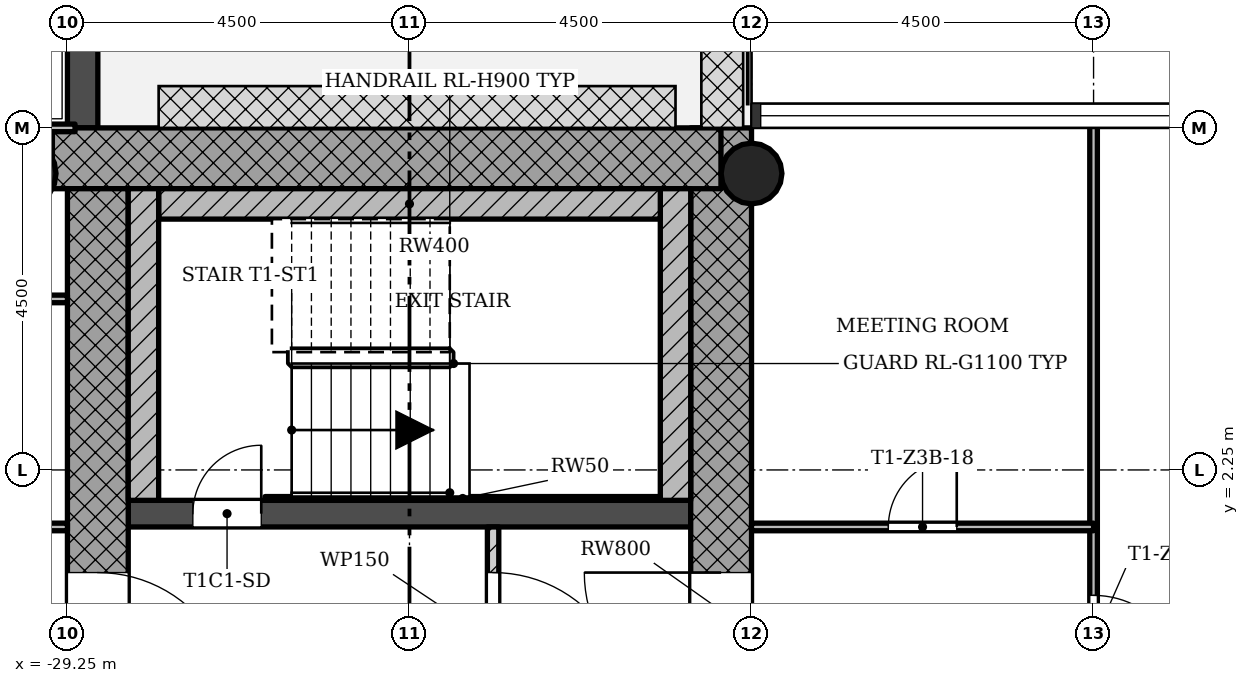
"""IFC4 building model, lengths in metres.
Left out: names, types, materials, properties, quantities, classifications, styles, units other than length and angle.
Written with IfcOpenShell. Run it as: python <this file> out.ifc"""

import sys

from ifc_helpers import new_model, si_unit, direction, frame, frame_2d, origin, origin_2d, place, context, subcontext, project, spatial, rectangle, hollow_circle, extrude, element, fill, save


model = new_model("IFC4")
c1 = context("Model", 3, precision=1e-05, world=origin(), true_north=direction((0.0, 1.0)))
c2 = subcontext(c1, "Body", "Model", "MODEL_VIEW")
j1 = project(units=[si_unit("LENGTHUNIT", "METRE"), si_unit("PLANEANGLEUNIT", "RADIAN")], contexts=[c1])
p1 = place(None, origin())
s1 = spatial("IfcSite", under=j1, at=p1, CompositionType="ELEMENT")
p2 = place(p1, origin())
s2 = spatial("IfcBuilding", under=s1, at=p2, CompositionType="ELEMENT")
p3 = place(p2, frame((0.0, 0.0, 147.3)))
s3 = spatial("IfcBuildingStorey", under=s2, at=p3, CompositionType="ELEMENT", Elevation=147.3)
p4 = place(p3, frame((-20.65, -5.95, 0.0), z_axis=(0.0, 0.0, 1.0), x_axis=(0.0, 1.0, 0.0)))
e1 = element("IfcWall", 1, at=p4, inside=s3, PredefinedType="SHEAR", context=c2, shape_type="SweptSolid", body=[
    extrude(rectangle(XDim=12.7, YDim=0.8, at=frame_2d((6.35, 0.0))), origin(), (0.0, 0.0, 1.0), 3.4),
])
p5 = place(p4, frame((5.05, 0.0, 0.0)))
e2 = element("IfcOpeningElement", 2, at=p5, cuts=e1, PredefinedType="OPENING", context=c2, shape_type="SweptSolid", body=[
    extrude(rectangle(XDim=1.8, YDim=2.1, at=frame_2d((0.9, 1.05))), frame((0.0, 0.41, 0.0), z_axis=(0.0, -1.0, 0.0), x_axis=(1.0, 0.0, 0.0)), (0.0, 0.0, 1.0), 0.82),
])
p6 = place(p3, frame((-20.652, 6.35, 0.0), z_axis=(0.0, 0.0, 1.0), x_axis=(-1.0, 0.0, 0.0)))
e3 = element("IfcWall", 3, at=p6, inside=s3, PredefinedType="SHEAR", context=c2, shape_type="SweptSolid", body=[
    extrude(rectangle(XDim=8.796, YDim=0.8, at=frame_2d((4.398, 0.0))), origin(), (0.0, 0.0, 1.0), 3.4),
])
p7 = place(p3, frame((-28.85, 5.95, 0.0), z_axis=(0.0, 0.0, 1.0), x_axis=(0.0, -1.0, 0.0)))
e4 = element("IfcWall", 4, at=p7, inside=s3, PredefinedType="SHEAR", context=c2, shape_type="SweptSolid", body=[
    extrude(rectangle(XDim=12.7, YDim=0.8, at=frame_2d((6.35, 0.0))), origin(), (0.0, 0.0, 1.0), 3.4),
])
p8 = place(p7, frame((5.05, 0.0, 0.0)))
e5 = element("IfcOpeningElement", 5, at=p8, cuts=e4, PredefinedType="OPENING", context=c2, shape_type="SweptSolid", body=[
    extrude(rectangle(XDim=1.8, YDim=2.1, at=frame_2d((0.9, 1.05))), frame((0.0, 0.41, 0.0), z_axis=(0.0, -1.0, 0.0), x_axis=(1.0, 0.0, 0.0)), (0.0, 0.0, 1.0), 0.82),
])
p9 = place(p3, frame((-28.45, 1.675, 0.0), z_axis=(0.0, 0.0, 1.0), x_axis=(1.0, 0.0, 0.0)))
e6 = element("IfcWall", 6, at=p9, inside=s3, PredefinedType="SHEAR", context=c2, shape_type="SweptSolid", body=[
    extrude(rectangle(XDim=7.4, YDim=0.35, at=frame_2d((3.7, 0.0))), origin(), (0.0, 0.0, 1.0), 3.4),
])
p10 = place(p9, frame((0.85, 0.0, 0.0)))
e7 = element("IfcOpeningElement", 7, at=p10, cuts=e6, PredefinedType="OPENING", context=c2, shape_type="SweptSolid", body=[
    extrude(rectangle(XDim=0.9, YDim=2.1, at=frame_2d((0.45, 1.05))), frame((0.0, 0.185, 0.0), z_axis=(0.0, -1.0, 0.0), x_axis=(1.0, 0.0, 0.0)), (0.0, 0.0, 1.0), 0.37),
])
p11 = place(p3, frame((-20.25, 6.15, 0.0), z_axis=(0.0, 0.0, 1.0), x_axis=(1.0, 0.0, 0.0)))
e8 = element("IfcColumn", 8, at=p11, inside=s3, PredefinedType="COLUMN", context=c2, shape_type="SweptSolid", body=[
    extrude(hollow_circle(Radius=0.4, WallThickness=0.028, at=origin_2d()), origin(), (0.0, 0.0, 1.0), 3.4),
])
p12 = place(p3, frame((-29.85, 6.15, 0.0), z_axis=(0.0, 0.0, 1.0), x_axis=(1.0, 0.0, 0.0)))
e9 = element("IfcColumn", 9, at=p12, inside=s3, PredefinedType="COLUMN", context=c2, shape_type="SweptSolid", body=[
    extrude(hollow_circle(Radius=0.45, WallThickness=0.032, at=origin_2d()), origin(), (0.0, 0.0, 1.0), 3.4),
])
p13 = place(p3, frame((-29.05, 6.75, -0.02), z_axis=(0.0, 0.0, 1.0), x_axis=(0.0, 1.0, 0.0)))
e10 = element("IfcWall", 10, at=p13, inside=s3, PredefinedType="STANDARD", context=c2, shape_type="SweptSolid", body=[
    extrude(rectangle(XDim=4.5, YDim=0.4, at=frame_2d((2.25, 0.0))), origin(), (0.0, 0.0, 1.0), 3.12),
])
p14 = place(p13, frame((1.35, 0.0, 0.02)))
e11 = element("IfcOpeningElement", 11, at=p14, cuts=e10, PredefinedType="OPENING", context=c2, shape_type="SweptSolid", body=[
    extrude(rectangle(XDim=1.8, YDim=2.1, at=frame_2d((0.9, 1.05))), frame((0.0, 0.21, 0.0), z_axis=(0.0, -1.0, 0.0), x_axis=(1.0, 0.0, 0.0)), (0.0, 0.0, 1.0), 0.42),
])
p15 = place(p3, frame((-23.65, -1.5, 0.0), z_axis=(0.0, 0.0, 1.0), x_axis=(0.0, 1.0, 0.0)))
e12 = element("IfcWall", 12, at=p15, inside=s3, PredefinedType="PARTITIONING", context=c2, shape_type="SweptSolid", body=[
    extrude(rectangle(XDim=3.0, YDim=0.15, at=frame_2d((1.5, 0.0))), origin(), (0.0, 0.0, 1.0), 3.0),
])
p16 = place(p15, frame((0.6, 0.0, 0.0)))
e13 = element("IfcOpeningElement", 13, at=p16, cuts=e12, PredefinedType="OPENING", context=c2, shape_type="SweptSolid", body=[
    extrude(rectangle(XDim=1.8, YDim=2.1, at=frame_2d((0.9, 1.05))), frame((0.0, 0.085, 0.0), z_axis=(0.0, -1.0, 0.0), x_axis=(1.0, 0.0, 0.0)), (0.0, 0.0, 1.0), 0.17),
])
p17 = place(p3, frame((-15.75, -1.5, 0.0), z_axis=(0.0, 0.0, 1.0), x_axis=(0.0, 1.0, 0.0)))
e14 = element("IfcWall", 14, at=p17, inside=s3, PredefinedType="PARTITIONING", context=c2, shape_type="SweptSolid", body=[
    extrude(rectangle(XDim=8.35, YDim=0.1, at=frame_2d((4.175, 0.0))), origin(), (0.0, 0.0, 1.0), 3.0),
])
p18 = place(p17, frame((0.9, 0.0, 0.0)))
e15 = element("IfcOpeningElement", 15, at=p18, cuts=e14, PredefinedType="OPENING", context=c2, shape_type="SweptSolid", body=[
    extrude(rectangle(XDim=1.2, YDim=2.1, at=frame_2d((0.6, 1.05))), frame((0.0, 0.06, 0.0), z_axis=(0.0, -1.0, 0.0), x_axis=(1.0, 0.0, 0.0)), (0.0, 0.0, 1.0), 0.12),
])
p19 = place(p3, frame((-31.5, 1.5, 0.0), z_axis=(0.0, 0.0, 1.0), x_axis=(1.0, 0.0, 0.0)))
e16 = element("IfcWall", 16, at=p19, inside=s3, PredefinedType="PARTITIONING", context=c2, shape_type="SweptSolid", body=[
    extrude(rectangle(XDim=2.25, YDim=0.1, at=frame_2d((1.125, 0.0))), origin(), (0.0, 0.0, 1.0), 3.0),
])
p20 = place(p3, frame((-20.25, 1.5, 0.0), z_axis=(0.0, 0.0, 1.0), x_axis=(1.0, 0.0, 0.0)))
e17 = element("IfcWall", 17, at=p20, inside=s3, PredefinedType="PARTITIONING", context=c2, shape_type="SweptSolid", body=[
    extrude(rectangle(XDim=4.5, YDim=0.1, at=frame_2d((2.25, 0.0))), origin(), (0.0, 0.0, 1.0), 3.0),
])
p21 = place(p20, frame((1.8, 0.0, 0.0)))
e18 = element("IfcOpeningElement", 18, at=p21, cuts=e17, PredefinedType="OPENING", context=c2, shape_type="SweptSolid", body=[
    extrude(rectangle(XDim=0.9, YDim=2.1, at=frame_2d((0.45, 1.05))), frame((0.0, 0.06, 0.0), z_axis=(0.0, -1.0, 0.0), x_axis=(1.0, 0.0, 0.0)), (0.0, 0.0, 1.0), 0.12),
])
p22 = place(p3, frame((-35.1, 4.5, 0.0), z_axis=(0.0, 0.0, 1.0), x_axis=(1.0, 0.0, 0.0)))
e19 = element("IfcWall", 19, at=p22, inside=s3, PredefinedType="PARTITIONING", context=c2, shape_type="SweptSolid", body=[
    extrude(rectangle(XDim=5.85, YDim=0.1, at=frame_2d((2.925, 0.0))), origin(), (0.0, 0.0, 1.0), 3.0),
])
p23 = place(p22, frame((1.35, 0.0, 0.0)))
e20 = element("IfcOpeningElement", 20, at=p23, cuts=e19, PredefinedType="OPENING", context=c2, shape_type="SweptSolid", body=[
    extrude(rectangle(XDim=0.9, YDim=2.1, at=frame_2d((0.45, 1.05))), frame((0.0, 0.06, 0.0), z_axis=(0.0, -1.0, 0.0), x_axis=(1.0, 0.0, 0.0)), (0.0, 0.0, 1.0), 0.12),
])
p24 = place(p3, frame((-35.1, 6.75, 0.0), z_axis=(0.0, 0.0, 1.0), x_axis=(1.0, 0.0, 0.0)))
e21 = element("IfcWall", 21, at=p24, inside=s3, PredefinedType="PARTITIONING", context=c2, shape_type="SweptSolid", body=[
    extrude(rectangle(XDim=5.95, YDim=0.1, at=frame_2d((2.975, 0.0))), origin(), (0.0, 0.0, 1.0), 3.0),
])
p25 = place(p3, frame((-21.25, 1.85, 0.0), z_axis=(0.0, 0.0, 1.0), x_axis=(0.0, 1.0, 0.0)))
e22 = element("IfcWall", 22, at=p25, inside=s3, PredefinedType="SHEAR", context=c2, shape_type="SweptSolid", body=[
    extrude(rectangle(XDim=4.1, YDim=0.4, at=frame_2d((2.05, 0.0))), origin(), (0.0, 0.0, 1.0), 3.4),
])
p26 = place(p3, frame((-28.05, 5.75, 0.0), z_axis=(0.0, 0.0, 1.0), x_axis=(1.0, 0.0, 0.0)))
e23 = element("IfcWall", 23, at=p26, inside=s3, PredefinedType="SHEAR", context=c2, shape_type="SweptSolid", body=[
    extrude(rectangle(XDim=6.6, YDim=0.4, at=frame_2d((3.3, 0.0))), origin(), (0.0, 0.0, 1.0), 3.4),
])
p27 = place(p3, frame((-28.25, 1.85, 0.0), z_axis=(0.0, 0.0, 1.0), x_axis=(0.0, 1.0, 0.0)))
e24 = element("IfcWall", 24, at=p27, inside=s3, PredefinedType="SHEAR", context=c2, shape_type="SweptSolid", body=[
    extrude(rectangle(XDim=4.1, YDim=0.4, at=frame_2d((2.05, 0.0))), origin(), (0.0, 0.0, 1.0), 3.4),
])
p28 = place(p3, frame((-26.65, 1.875, 0.0), z_axis=(0.0, 0.0, 1.0), x_axis=(1.0, 0.0, 0.0)))
e25 = element("IfcWall", 25, at=p28, inside=s3, PredefinedType="SHEAR", context=c2, shape_type="SweptSolid", body=[
    extrude(rectangle(XDim=5.2, YDim=0.05, at=frame_2d((2.6, 0.0))), origin(), (0.0, 0.0, 1.0), 3.4),
])
p29 = place(p16, origin())
e26 = element("IfcDoor", 26, at=p29, inside=s3, OperationType="SINGLE_SWING_LEFT", PredefinedType="DOOR", context=c2, shape_type="SweptSolid", body=[
    extrude(rectangle(XDim=1.8, YDim=2.1, at=frame_2d((0.9, 1.05))), frame((0.0, 0.025, 0.0), z_axis=(0.0, -1.0, 0.0), x_axis=(1.0, 0.0, 0.0)), (0.0, 0.0, 1.0), 0.05),
])
fill(e13, e26)
p30 = place(p21, origin())
e27 = element("IfcDoor", 27, at=p30, inside=s3, OperationType="SINGLE_SWING_LEFT", PredefinedType="DOOR", context=c2, shape_type="SweptSolid", body=[
    extrude(rectangle(XDim=0.9, YDim=2.1, at=frame_2d((0.45, 1.05))), frame((0.0, 0.025, 0.0), z_axis=(0.0, -1.0, 0.0), x_axis=(1.0, 0.0, 0.0)), (0.0, 0.0, 1.0), 0.05),
])
fill(e18, e27)
p31 = place(p18, origin())
e28 = element("IfcDoor", 28, at=p31, inside=s3, OperationType="SINGLE_SWING_LEFT", PredefinedType="DOOR", context=c2, shape_type="SweptSolid", body=[
    extrude(rectangle(XDim=1.2, YDim=2.1, at=frame_2d((0.6, 1.05))), frame((0.0, 0.025, 0.0), z_axis=(0.0, -1.0, 0.0), x_axis=(1.0, 0.0, 0.0)), (0.0, 0.0, 1.0), 0.05),
])
fill(e15, e28)
p32 = place(p10, origin())
e29 = element("IfcDoor", 29, at=p32, inside=s3, OperationType="SINGLE_SWING_LEFT", PredefinedType="DOOR", context=c2, shape_type="SweptSolid", body=[
    extrude(rectangle(XDim=0.9, YDim=2.1, at=frame_2d((0.45, 1.05))), frame((0.0, 0.025, 0.0), z_axis=(0.0, -1.0, 0.0), x_axis=(1.0, 0.0, 0.0)), (0.0, 0.0, 1.0), 0.05),
])
fill(e7, e29)
p33 = place(p8, origin())
e30 = element("IfcDoor", 30, at=p33, inside=s3, OperationType="SINGLE_SWING_LEFT", PredefinedType="DOOR", context=c2, shape_type="SweptSolid", body=[
    extrude(rectangle(XDim=1.8, YDim=2.1, at=frame_2d((0.9, 1.05))), frame((0.0, 0.025, 0.0), z_axis=(0.0, -1.0, 0.0), x_axis=(1.0, 0.0, 0.0)), (0.0, 0.0, 1.0), 0.05),
])
fill(e5, e30)
p34 = place(p5, origin())
e31 = element("IfcDoor", 31, at=p34, inside=s3, OperationType="SINGLE_SWING_LEFT", PredefinedType="DOOR", context=c2, shape_type="SweptSolid", body=[
    extrude(rectangle(XDim=1.8, YDim=2.1, at=frame_2d((0.9, 1.05))), frame((0.0, 0.025, 0.0), z_axis=(0.0, -1.0, 0.0), x_axis=(1.0, 0.0, 0.0)), (0.0, 0.0, 1.0), 0.05),
])
fill(e2, e31)
save(model, sys.argv[1])
